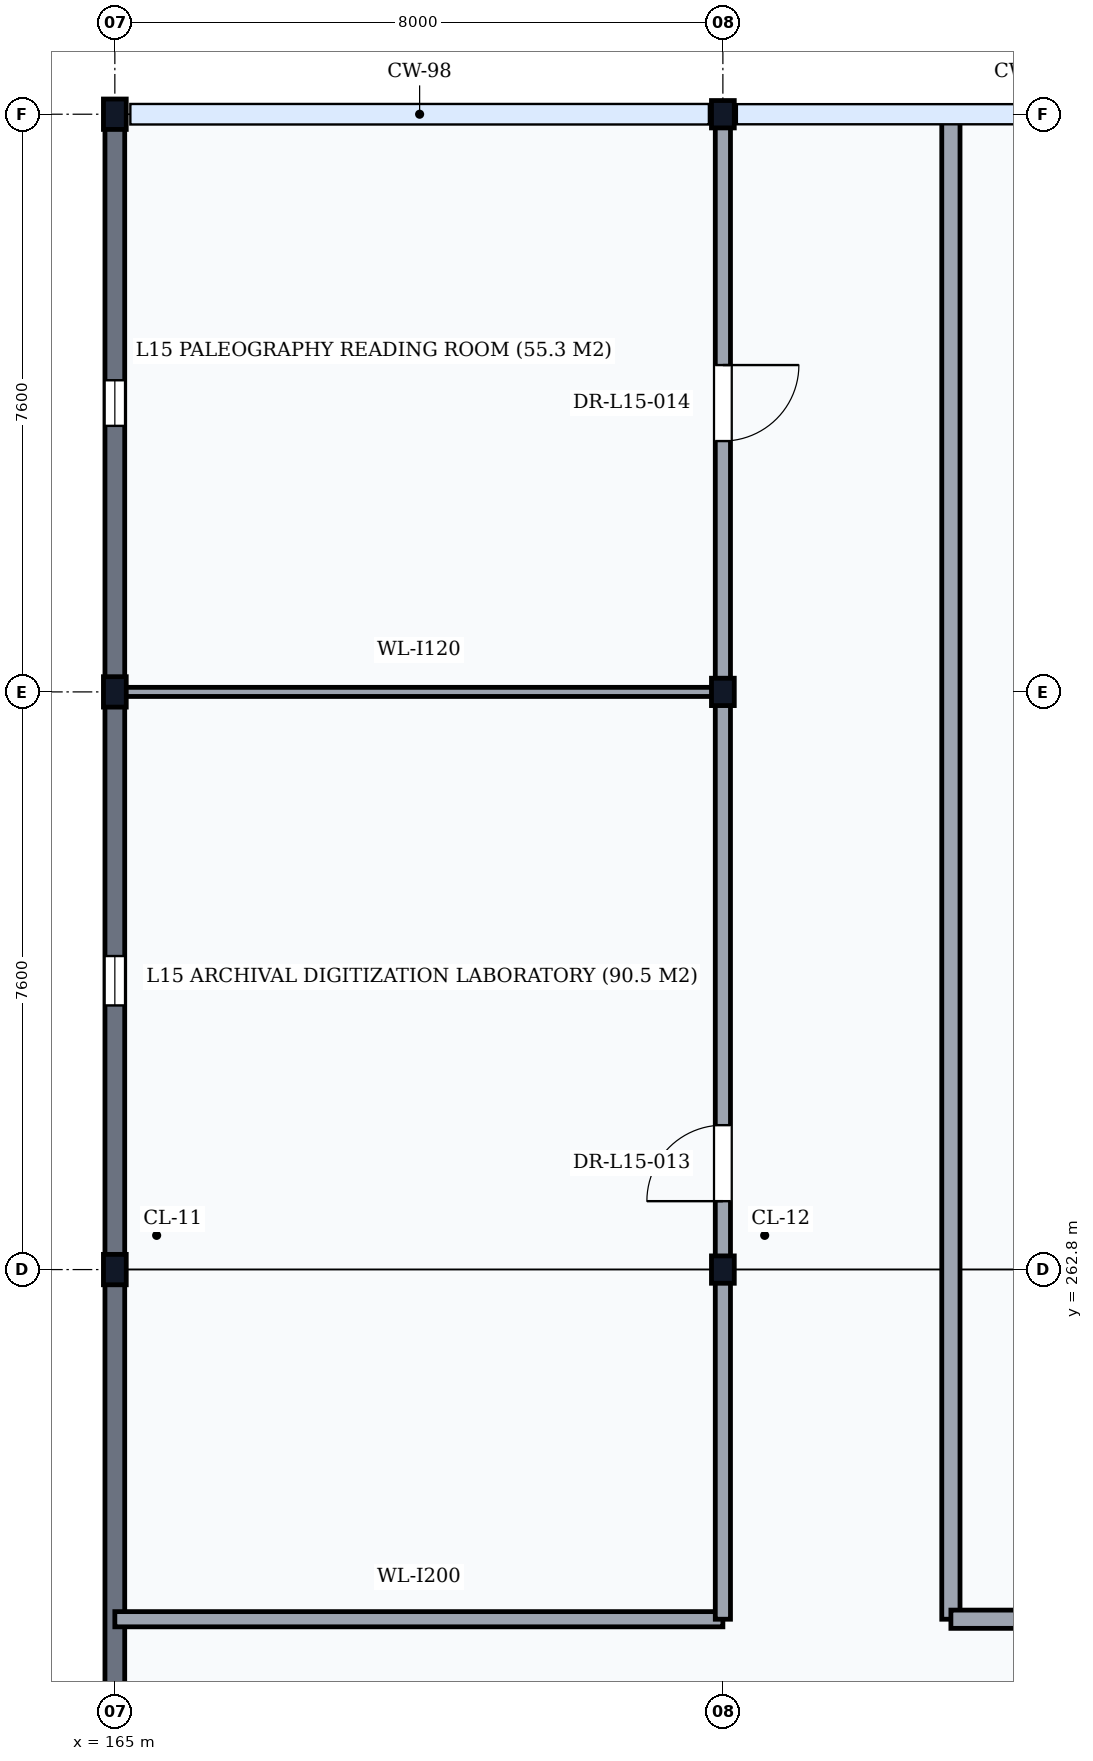
"""IFC4 building model, lengths in metres.
Left out: names, types, materials, properties, quantities, classifications, styles, units other than length and angle.
Written with IfcOpenShell. Run it as: python <this file> out.ifc"""

import sys

from ifc_helpers import new_model, si_unit, direction, frame, frame_2d, origin, origin_2d, place, context, subcontext, project, spatial, rectangle, i_section, extrude, element, fill, save


model = new_model("IFC4")
c1 = context("Model", 3, precision=1e-05, world=origin(), true_north=direction((0.0, 1.0)))
c2 = subcontext(c1, "Body", "Model", "MODEL_VIEW")
j1 = project(units=[si_unit("LENGTHUNIT", "METRE"), si_unit("PLANEANGLEUNIT", "RADIAN")], contexts=[c1])
p1 = place(None, origin())
s1 = spatial("IfcSite", under=j1, at=p1, CompositionType="ELEMENT")
p2 = place(p1, origin())
s2 = spatial("IfcBuilding", under=s1, at=p2, CompositionType="ELEMENT")
p3 = place(p2, frame((0.0, 0.0, 60.0)))
s3 = spatial("IfcBuildingStorey", under=s2, at=p3, CompositionType="ELEMENT", Elevation=60.0)
for number, where, z_axis, x_axis in (
    (1, (165.0, 262.8, 0.0), (0.0, 0.0, 1.0), (1.0, 0.0, 0.0)),
    (2, (165.0, 270.4, 0.0), (0.0, 0.0, 1.0), (1.0, 0.0, 0.0)),
    (3, (165.0, 278.0, 0.0), (0.0, 0.0, 1.0), (1.0, 0.0, 0.0)),
):
    element("IfcColumn", number, at=place(p3, frame(where, z_axis=z_axis, x_axis=x_axis)), inside=s3, PredefinedType="COLUMN", context=c2, shape_type="SweptSolid", body=[
        extrude(i_section(OverallWidth=0.3, OverallDepth=0.4, WebThickness=0.013, FlangeThickness=0.024, FilletRadius=0.027, at=origin_2d()), origin(), (0.0, 0.0, 1.0), 3.9),
    ])
for number, where, z_axis, x_axis in (
    (4, (173.0, 262.8, 0.0), (0.0, 0.0, 1.0), (1.0, 0.0, 0.0)),
    (5, (173.0, 270.4, 0.0), (0.0, 0.0, 1.0), (1.0, 0.0, 0.0)),
    (6, (173.0, 278.0, 0.0), (0.0, 0.0, 1.0), (1.0, 0.0, 0.0)),
):
    element("IfcColumn", number, at=place(p3, frame(where, z_axis=z_axis, x_axis=x_axis)), inside=s3, PredefinedType="COLUMN", context=c2, shape_type="SweptSolid", body=[
        extrude(i_section(OverallWidth=0.3, OverallDepth=0.36, WebThickness=0.012, FlangeThickness=0.022, FilletRadius=0.027, at=origin_2d()), origin(), (0.0, 0.0, 1.0), 3.9),
    ])
p4 = place(p3, frame((165.0, 255.206, 0.0), z_axis=(0.0, 0.0, 1.0), x_axis=(0.0, 1.0, 0.0)))
e7 = element("IfcWall", 7, at=p4, inside=s3, PredefinedType="SOLIDWALL", context=c2, shape_type="SweptSolid", body=[
    extrude(rectangle(XDim=7.588, YDim=0.26, at=frame_2d((3.794, 0.0))), origin(), (0.0, 0.0, 1.0), 3.308),
])
p5 = place(p3, frame((165.0, 262.806, 0.0), z_axis=(0.0, 0.0, 1.0), x_axis=(0.0, 1.0, 0.0)))
e8 = element("IfcWall", 8, at=p5, inside=s3, PredefinedType="SOLIDWALL", context=c2, shape_type="SweptSolid", body=[
    extrude(rectangle(XDim=7.588, YDim=0.26, at=frame_2d((3.794, 0.0))), origin(), (0.0, 0.0, 1.0), 3.308),
])
p6 = place(p5, frame((3.469, 0.0, 0.95)))
e9 = element("IfcOpeningElement", 9, at=p6, cuts=e8, PredefinedType="OPENING", context=c2, shape_type="SweptSolid", body=[
    extrude(rectangle(XDim=0.65, YDim=1.8, at=frame_2d((0.325, 0.9))), frame((0.0, 0.145, 0.0), z_axis=(0.0, -1.0, 0.0), x_axis=(1.0, 0.0, 0.0)), (0.0, 0.0, 1.0), 0.29),
])
p7 = place(p3, frame((165.0, 270.406, 0.0), z_axis=(0.0, 0.0, 1.0), x_axis=(0.0, 1.0, 0.0)))
e10 = element("IfcWall", 10, at=p7, inside=s3, PredefinedType="SOLIDWALL", context=c2, shape_type="SweptSolid", body=[
    extrude(rectangle(XDim=7.588, YDim=0.26, at=frame_2d((3.794, 0.0))), origin(), (0.0, 0.0, 1.0), 3.308),
])
p8 = place(p7, frame((3.494, 0.0, 0.95)))
e11 = element("IfcOpeningElement", 11, at=p8, cuts=e10, PredefinedType="OPENING", context=c2, shape_type="SweptSolid", body=[
    extrude(rectangle(XDim=0.6, YDim=1.5, at=frame_2d((0.3, 0.75))), frame((0.0, 0.145, 0.0), z_axis=(0.0, -1.0, 0.0), x_axis=(1.0, 0.0, 0.0)), (0.0, 0.0, 1.0), 0.29),
])
p9 = place(p3, frame((165.0, 258.2, 0.0), z_axis=(0.0, 0.0, 1.0), x_axis=(1.0, 0.0, 0.0)))
e12 = element("IfcWall", 12, at=p9, inside=s3, PredefinedType="PARTITIONING", context=c2, shape_type="SweptSolid", body=[
    extrude(rectangle(XDim=8.0, YDim=0.2, at=frame_2d((4.0, 0.0))), origin(), (0.0, 0.0, 1.0), 3.58),
])
p10 = place(p3, frame((173.0, 258.2, 0.0), z_axis=(0.0, 0.0, 1.0), x_axis=(0.0, 1.0, 0.0)))
e13 = element("IfcWall", 13, at=p10, inside=s3, PredefinedType="PARTITIONING", context=c2, shape_type="SweptSolid", body=[
    extrude(rectangle(XDim=19.8, YDim=0.2, at=frame_2d((9.9, 0.0))), origin(), (0.0, 0.0, 1.0), 3.028),
])
p11 = place(p10, frame((5.5, 0.0, 0.0)))
e14 = element("IfcOpeningElement", 14, at=p11, cuts=e13, PredefinedType="OPENING", context=c2, shape_type="SweptSolid", body=[
    extrude(rectangle(XDim=1.0, YDim=2.1, at=frame_2d((0.5, 1.05))), frame((0.0, 0.115, 0.0), z_axis=(0.0, -1.0, 0.0), x_axis=(1.0, 0.0, 0.0)), (0.0, 0.0, 1.0), 0.23),
])
p12 = place(p10, frame((15.5, 0.0, 0.0)))
e15 = element("IfcOpeningElement", 15, at=p12, cuts=e13, PredefinedType="OPENING", context=c2, shape_type="SweptSolid", body=[
    extrude(rectangle(XDim=1.0, YDim=2.1, at=frame_2d((0.5, 1.05))), frame((0.0, 0.115, 0.0), z_axis=(0.0, -1.0, 0.0), x_axis=(1.0, 0.0, 0.0)), (0.0, 0.0, 1.0), 0.23),
])
p13 = place(p3, frame((165.0, 270.4, 0.0), z_axis=(0.0, 0.0, 1.0), x_axis=(1.0, 0.0, 0.0)))
e16 = element("IfcWall", 16, at=p13, inside=s3, PredefinedType="PARTITIONING", context=c2, shape_type="SweptSolid", body=[
    extrude(rectangle(XDim=8.0, YDim=0.12, at=frame_2d((4.0, 0.0))), origin(), (0.0, 0.0, 1.0), 3.028),
])
p14 = place(p3, frame((176.0, 258.2, 0.0), z_axis=(0.0, 0.0, 1.0), x_axis=(0.0, 1.0, 0.0)))
e17 = element("IfcWall", 17, at=p14, inside=s3, PredefinedType="PARTITIONING", context=c2, shape_type="SweptSolid", body=[
    extrude(rectangle(XDim=19.8, YDim=0.24, at=frame_2d((9.9, 0.0))), origin(), (0.0, 0.0, 1.0), 3.58),
])
p15 = place(p3, frame((176.0, 258.2, 0.0), z_axis=(0.0, 0.0, 1.0), x_axis=(1.0, 0.0, 0.0)))
e18 = element("IfcWall", 18, at=p15, inside=s3, PredefinedType="PARTITIONING", context=c2, shape_type="SweptSolid", body=[
    extrude(rectangle(XDim=37.0, YDim=0.24, at=frame_2d((18.5, 0.0))), origin(), (0.0, 0.0, 1.0), 3.58),
])
p16 = place(p15, frame((3.36, 0.0, 0.0)))
e19 = element("IfcOpeningElement", 19, at=p16, cuts=e18, PredefinedType="OPENING", context=c2, shape_type="SweptSolid", body=[
    extrude(rectangle(XDim=1.1, YDim=2.1, at=frame_2d((0.55, 1.05))), frame((0.0, 0.135, 0.0), z_axis=(0.0, -1.0, 0.0), x_axis=(1.0, 0.0, 0.0)), (0.0, 0.0, 1.0), 0.27),
])
p17 = place(p15, frame((13.54, 0.0, 0.0)))
e20 = element("IfcOpeningElement", 20, at=p17, cuts=e18, PredefinedType="OPENING", context=c2, shape_type="SweptSolid", body=[
    extrude(rectangle(XDim=1.1, YDim=2.1, at=frame_2d((0.55, 1.05))), frame((0.0, 0.135, 0.0), z_axis=(0.0, -1.0, 0.0), x_axis=(1.0, 0.0, 0.0)), (0.0, 0.0, 1.0), 0.27),
])
p18 = place(p15, frame((21.95, 0.0, 0.0)))
e21 = element("IfcOpeningElement", 21, at=p18, cuts=e18, PredefinedType="OPENING", context=c2, shape_type="SweptSolid", body=[
    extrude(rectangle(XDim=1.1, YDim=2.1, at=frame_2d((0.55, 1.05))), frame((0.0, 0.135, 0.0), z_axis=(0.0, -1.0, 0.0), x_axis=(1.0, 0.0, 0.0)), (0.0, 0.0, 1.0), 0.27),
])
p19 = place(p15, frame((31.45, 0.0, 0.0)))
e22 = element("IfcOpeningElement", 22, at=p19, cuts=e18, PredefinedType="OPENING", context=c2, shape_type="SweptSolid", body=[
    extrude(rectangle(XDim=1.1, YDim=2.1, at=frame_2d((0.55, 1.05))), frame((0.0, 0.135, 0.0), z_axis=(0.0, -1.0, 0.0), x_axis=(1.0, 0.0, 0.0)), (0.0, 0.0, 1.0), 0.27),
])
p20 = place(p6, origin())
e23 = element("IfcWindow", 23, at=p20, inside=s3, PartitioningType="SINGLE_PANEL", PredefinedType="WINDOW", context=c2, shape_type="SweptSolid", body=[
    extrude(rectangle(XDim=0.65, YDim=1.8, at=frame_2d((0.325, 0.9))), frame((0.0, 0.03, 0.0), z_axis=(0.0, -1.0, 0.0), x_axis=(1.0, 0.0, 0.0)), (0.0, 0.0, 1.0), 0.06),
])
fill(e9, e23)
p21 = place(p8, origin())
e24 = element("IfcWindow", 24, at=p21, inside=s3, PartitioningType="SINGLE_PANEL", PredefinedType="WINDOW", context=c2, shape_type="SweptSolid", body=[
    extrude(rectangle(XDim=0.6, YDim=1.5, at=frame_2d((0.3, 0.75))), frame((0.0, 0.03, 0.0), z_axis=(0.0, -1.0, 0.0), x_axis=(1.0, 0.0, 0.0)), (0.0, 0.0, 1.0), 0.06),
])
fill(e11, e24)
p22 = place(p11, origin())
e25 = element("IfcDoor", 25, at=p22, inside=s3, OperationType="SINGLE_SWING_LEFT", PredefinedType="DOOR", context=c2, shape_type="SweptSolid", body=[
    extrude(rectangle(XDim=1.0, YDim=2.1, at=frame_2d((0.5, 1.05))), frame((0.0, 0.025, 0.0), z_axis=(0.0, -1.0, 0.0), x_axis=(1.0, 0.0, 0.0)), (0.0, 0.0, 1.0), 0.05),
])
fill(e14, e25)
p23 = place(p12, origin())
e26 = element("IfcDoor", 26, at=p23, inside=s3, OperationType="SINGLE_SWING_RIGHT", PredefinedType="DOOR", context=c2, shape_type="SweptSolid", body=[
    extrude(rectangle(XDim=1.0, YDim=2.1, at=frame_2d((0.5, 1.05))), frame((0.0, 0.025, 0.0), z_axis=(0.0, -1.0, 0.0), x_axis=(1.0, 0.0, 0.0)), (0.0, 0.0, 1.0), 0.05),
])
fill(e15, e26)
save(model, sys.argv[1])
